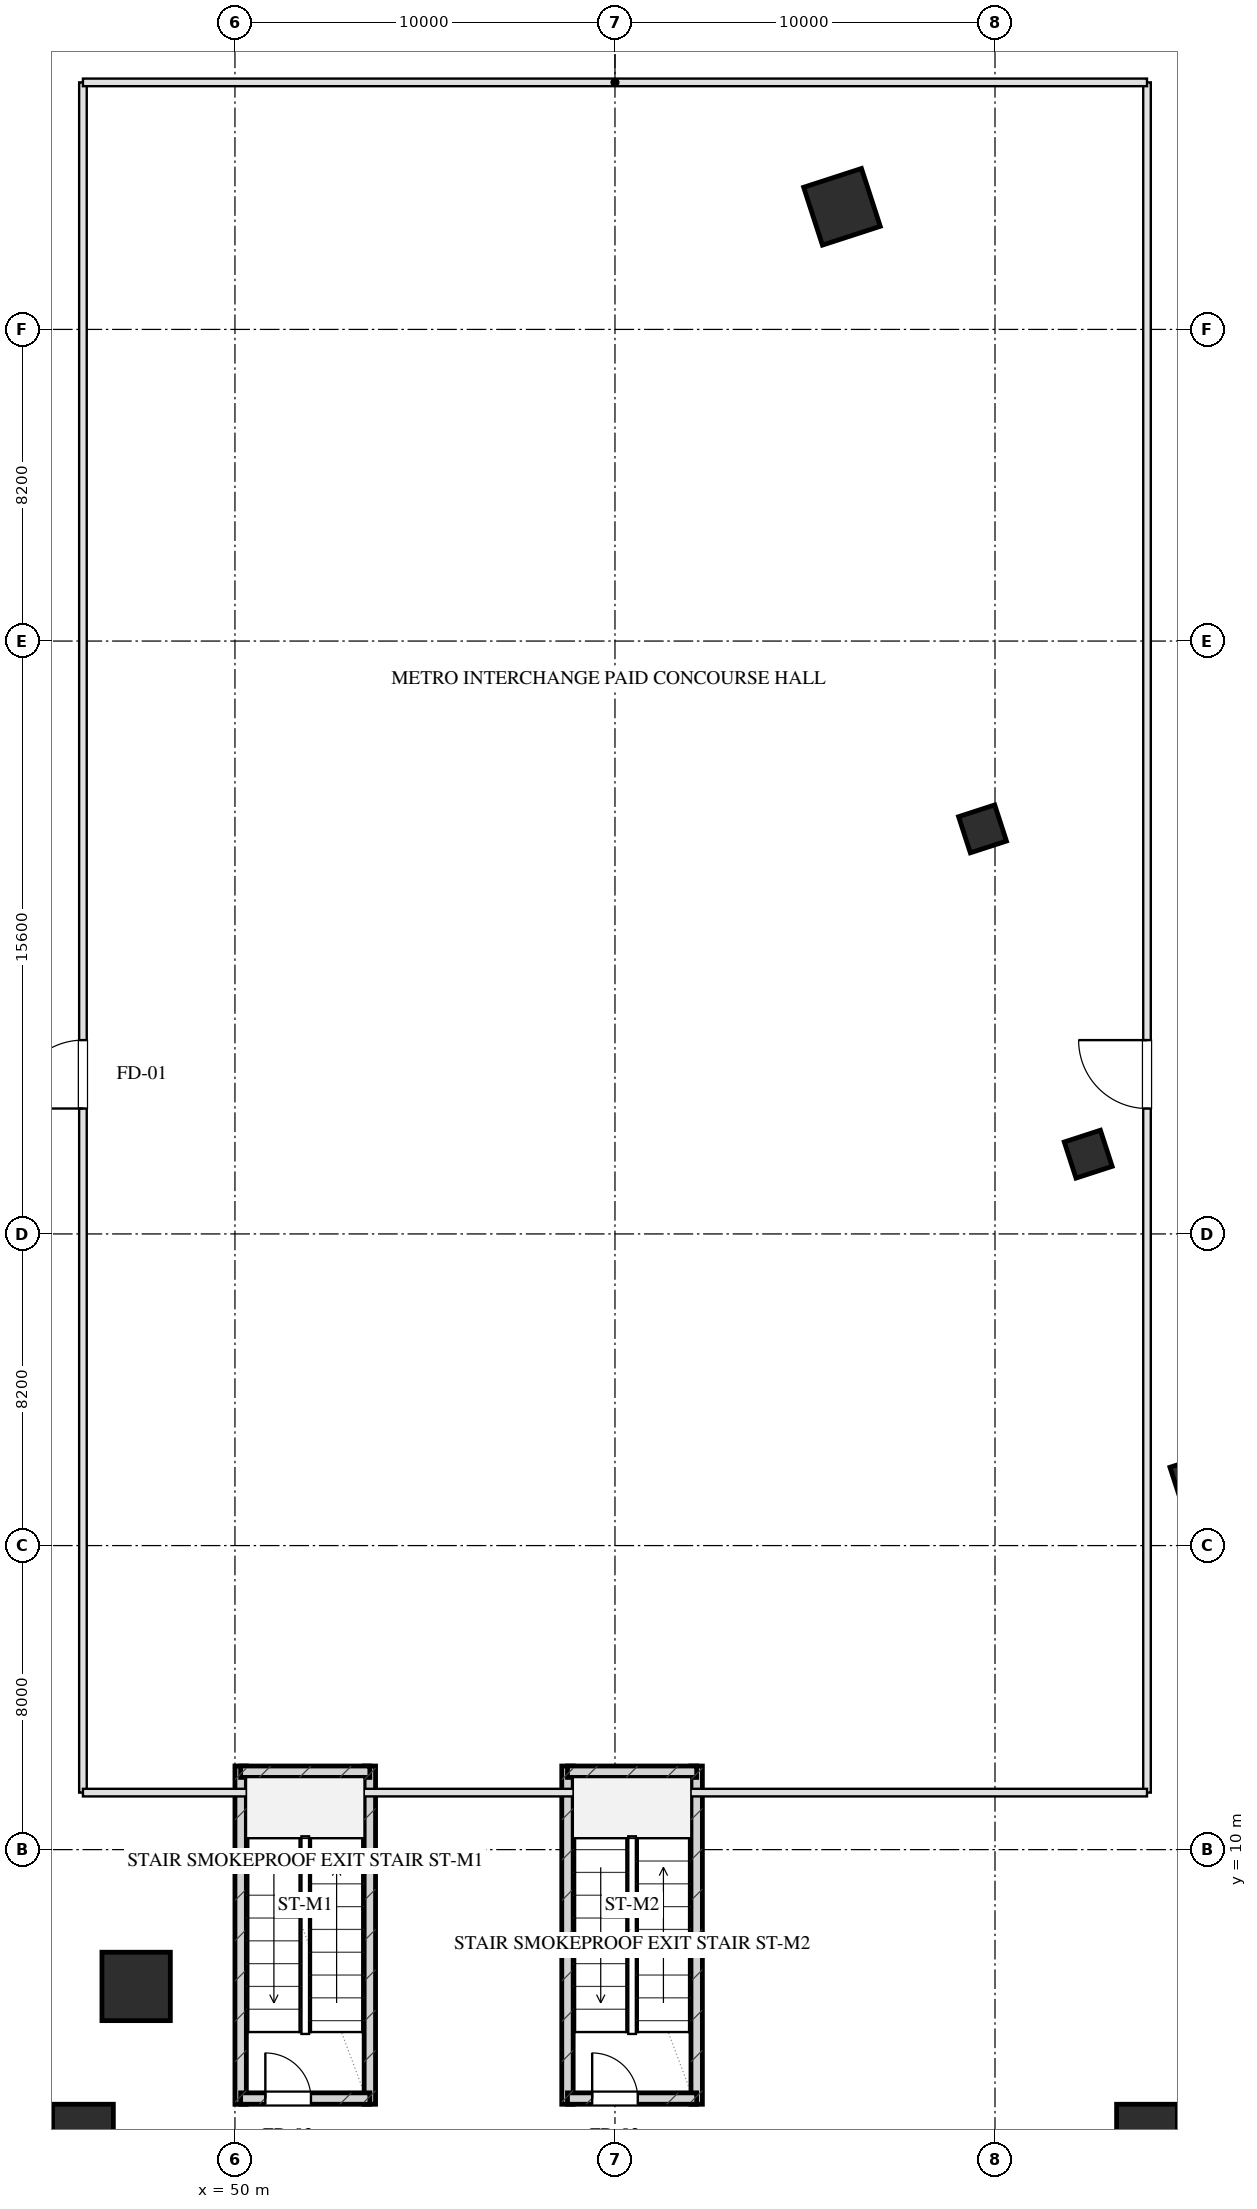
"""IFC4 building model, lengths in metres.
Left out: names, types, materials, properties, quantities, classifications, styles, units other than length and angle.
Written with IfcOpenShell. Run it as: python <this file> out.ifc"""

import sys

from ifc_helpers import new_model, si_unit, direction, frame, frame_2d, origin, origin_2d, place, context, subcontext, project, spatial, rectangle, hollow_rectangle, extrude, element, fill, save


model = new_model("IFC4")
c1 = context("Model", 3, precision=1e-05, world=origin(), true_north=direction((0.0, 1.0)))
c2 = subcontext(c1, "Body", "Model", "MODEL_VIEW")
j1 = project(units=[si_unit("LENGTHUNIT", "METRE"), si_unit("PLANEANGLEUNIT", "RADIAN")], contexts=[c1])
p1 = place(None, origin())
s1 = spatial("IfcSite", under=j1, at=p1, CompositionType="ELEMENT")
p2 = place(p1, origin())
s2 = spatial("IfcBuilding", under=s1, at=p2, CompositionType="ELEMENT")
p3 = place(p2, frame((0.0, 0.0, -6.0)))
s3 = spatial("IfcBuildingStorey", under=s2, at=p3, CompositionType="ELEMENT", Elevation=-6.0)
for number, where, z_axis, x_axis in (
    (1, (50.15, 3.3, 0.0), (0.0, 0.0, 1.0), (0.0, 1.0, 0.0)),
    (2, (53.55, 3.3, 0.0), (0.0, 0.0, 1.0), (0.0, 1.0, 0.0)),
):
    element("IfcWall", number, at=place(p3, frame(where, z_axis=z_axis, x_axis=x_axis)), inside=s3, PredefinedType="SHEAR", context=c2, shape_type="SweptSolid", body=[
        extrude(rectangle(XDim=8.9, YDim=0.3, at=frame_2d((4.45, 0.0))), origin(), (0.0, 0.0, 1.0), 6.0),
    ])
p4 = place(p3, frame((50.15, 12.05, 0.0), z_axis=(0.0, 0.0, 1.0), x_axis=(1.0, 0.0, 0.0)))
e3 = element("IfcWall", 3, at=p4, inside=s3, PredefinedType="SHEAR", context=c2, shape_type="SweptSolid", body=[
    extrude(rectangle(XDim=3.4, YDim=0.3, at=frame_2d((1.7, 0.0))), origin(), (0.0, 0.0, 1.0), 6.0),
])
p5 = place(p3, frame((50.15, 3.45, 0.0), z_axis=(0.0, 0.0, 1.0), x_axis=(1.0, 0.0, 0.0)))
e4 = element("IfcWall", 4, at=p5, inside=s3, PredefinedType="SHEAR", context=c2, shape_type="SweptSolid", body=[
    extrude(rectangle(XDim=3.4, YDim=0.3, at=frame_2d((1.7, 0.0))), origin(), (0.0, 0.0, 1.0), 6.0),
])
p6 = place(p5, frame((0.65, 0.0, 0.0)))
e5 = element("IfcOpeningElement", 5, at=p6, cuts=e4, PredefinedType="OPENING", context=c2, shape_type="SweptSolid", body=[
    extrude(rectangle(XDim=1.2, YDim=2.05, at=frame_2d((0.6, 1.025))), frame((0.0, 0.16, 0.0), z_axis=(0.0, -1.0, 0.0), x_axis=(1.0, 0.0, 0.0)), (0.0, 0.0, 1.0), 0.32),
])
for number, where, z_axis, x_axis in (
    (6, (58.75, 3.3, 0.0), (0.0, 0.0, 1.0), (0.0, 1.0, 0.0)),
    (7, (62.15, 3.3, 0.0), (0.0, 0.0, 1.0), (0.0, 1.0, 0.0)),
):
    element("IfcWall", number, at=place(p3, frame(where, z_axis=z_axis, x_axis=x_axis)), inside=s3, PredefinedType="SHEAR", context=c2, shape_type="SweptSolid", body=[
        extrude(rectangle(XDim=8.9, YDim=0.3, at=frame_2d((4.45, 0.0))), origin(), (0.0, 0.0, 1.0), 6.0),
    ])
p7 = place(p3, frame((58.75, 12.05, 0.0), z_axis=(0.0, 0.0, 1.0), x_axis=(1.0, 0.0, 0.0)))
e8 = element("IfcWall", 8, at=p7, inside=s3, PredefinedType="SHEAR", context=c2, shape_type="SweptSolid", body=[
    extrude(rectangle(XDim=3.4, YDim=0.3, at=frame_2d((1.7, 0.0))), origin(), (0.0, 0.0, 1.0), 6.0),
])
p8 = place(p3, frame((58.75, 3.45, 0.0), z_axis=(0.0, 0.0, 1.0), x_axis=(1.0, 0.0, 0.0)))
e9 = element("IfcWall", 9, at=p8, inside=s3, PredefinedType="SHEAR", context=c2, shape_type="SweptSolid", body=[
    extrude(rectangle(XDim=3.4, YDim=0.3, at=frame_2d((1.7, 0.0))), origin(), (0.0, 0.0, 1.0), 6.0),
])
p9 = place(p8, frame((0.65, 0.0, 0.0)))
e10 = element("IfcOpeningElement", 10, at=p9, cuts=e9, PredefinedType="OPENING", context=c2, shape_type="SweptSolid", body=[
    extrude(rectangle(XDim=1.2, YDim=2.05, at=frame_2d((0.6, 1.025))), frame((0.0, 0.16, 0.0), z_axis=(0.0, -1.0, 0.0), x_axis=(1.0, 0.0, 0.0)), (0.0, 0.0, 1.0), 0.32),
])
for number, where, z_axis, x_axis in (
    (11, (46.0, 2.5, 0.0), (0.0, 0.0, 1.0), (1.0, 0.0, 0.0)),
    (12, (74.0, 2.5, 0.0), (0.0, 0.0, 1.0), (1.0, 0.0, 0.0)),
):
    element("IfcColumn", number, at=place(p3, frame(where, z_axis=z_axis, x_axis=x_axis)), inside=s3, PredefinedType="COLUMN", context=c2, shape_type="SweptSolid", body=[
        extrude(hollow_rectangle(XDim=1.6, YDim=1.6, WallThickness=0.055, at=origin_2d()), origin(), (0.0, 0.0, 1.0), 6.001),
    ])
p10 = place(p3, frame((47.4, 6.4, 0.0), z_axis=(0.0, 0.0, 1.0), x_axis=(1.0, 0.0, 0.0)))
e13 = element("IfcColumn", 13, at=p10, inside=s3, PredefinedType="COLUMN", context=c2, shape_type="SweptSolid", body=[
    extrude(hollow_rectangle(XDim=1.8, YDim=1.8, WallThickness=0.06, at=origin_2d()), origin(), (0.0, 0.0, 1.0), 6.001),
])
p11 = place(p3, frame((65.973, 53.226, 0.0), z_axis=(0.0, 0.0, 1.0), x_axis=(0.951056516295, 0.309016994375, 0.0)))
e14 = element("IfcColumn", 14, at=p11, inside=s3, PredefinedType="COLUMN", context=c2, shape_type="SweptSolid", body=[
    extrude(hollow_rectangle(XDim=1.6, YDim=1.6, WallThickness=0.055, at=origin_2d()), origin(), (0.0, 0.0, 1.0), 6.001),
])
for number, where, z_axis, x_axis in (
    (15, (75.234, 19.739, 0.0), (0.0, 0.0, 1.0), (0.951, 0.309, 0.0)),
    (16, (72.453, 28.299, 0.0), (0.0, 0.0, 1.0), (0.951, 0.309, 0.0)),
    (17, (69.672, 36.858, 0.0), (0.0, 0.0, 1.0), (0.951, 0.309, 0.0)),
):
    element("IfcColumn", number, at=place(p3, frame(where, z_axis=z_axis, x_axis=x_axis)), inside=s3, PredefinedType="COLUMN", context=c2, shape_type="SweptSolid", body=[
        extrude(hollow_rectangle(XDim=1.0, YDim=1.0, WallThickness=0.036, at=origin_2d()), origin(), (0.0, 0.0, 1.0), 6.001),
    ])
p12 = place(p3, frame((46.0, 11.5, 0.0), z_axis=(0.0, 0.0, 1.0), x_axis=(0.0, 1.0, 0.0)))
e18 = element("IfcWall", 18, at=p12, inside=s3, PredefinedType="PARTITIONING", context=c2, shape_type="SweptSolid", body=[
    extrude(rectangle(XDim=45.0, YDim=0.2, at=frame_2d((22.5, 0.0))), origin(), (0.0, 0.0, 1.0), 5.685),
])
p13 = place(p12, frame((18.0, 0.0, 0.0)))
e19 = element("IfcOpeningElement", 19, at=p13, cuts=e18, PredefinedType="OPENING", context=c2, shape_type="SweptSolid", body=[
    extrude(rectangle(XDim=1.8, YDim=2.05, at=frame_2d((0.9, 1.025))), frame((0.0, 0.11, 0.0), z_axis=(0.0, -1.0, 0.0), x_axis=(1.0, 0.0, 0.0)), (0.0, 0.0, 1.0), 0.22),
])
p14 = place(p3, frame((74.0, 11.5, 0.0), z_axis=(0.0, 0.0, 1.0), x_axis=(0.0, 1.0, 0.0)))
e20 = element("IfcWall", 20, at=p14, inside=s3, PredefinedType="PARTITIONING", context=c2, shape_type="SweptSolid", body=[
    extrude(rectangle(XDim=45.0, YDim=0.2, at=frame_2d((22.5, 0.0))), origin(), (0.0, 0.0, 1.0), 5.685),
])
p15 = place(p14, frame((18.0, 0.0, 0.0)))
e21 = element("IfcOpeningElement", 21, at=p15, cuts=e20, PredefinedType="OPENING", context=c2, shape_type="SweptSolid", body=[
    extrude(rectangle(XDim=1.8, YDim=2.05, at=frame_2d((0.9, 1.025))), frame((0.0, 0.11, 0.0), z_axis=(0.0, -1.0, 0.0), x_axis=(1.0, 0.0, 0.0)), (0.0, 0.0, 1.0), 0.22),
])
for number, where, z_axis, x_axis in (
    (22, (46.0, 56.5, 0.0), (0.0, 0.0, 1.0), (1.0, 0.0, 0.0)),
    (23, (46.0, 11.5, 0.0), (0.0, 0.0, 1.0), (1.0, 0.0, 0.0)),
):
    element("IfcWall", number, at=place(p3, frame(where, z_axis=z_axis, x_axis=x_axis)), inside=s3, PredefinedType="PARTITIONING", context=c2, shape_type="SweptSolid", body=[
        extrude(rectangle(XDim=28.0, YDim=0.2, at=frame_2d((14.0, 0.0))), origin(), (0.0, 0.0, 1.0), 5.685),
    ])
p16 = place(p13, origin())
e24 = element("IfcDoor", 24, at=p16, inside=s3, OperationType="SINGLE_SWING_LEFT", PredefinedType="DOOR", context=c2, shape_type="SweptSolid", body=[
    extrude(rectangle(XDim=1.8, YDim=2.05, at=frame_2d((0.9, 1.025))), frame((0.0, 0.025, 0.0), z_axis=(0.0, -1.0, 0.0), x_axis=(1.0, 0.0, 0.0)), (0.0, 0.0, 1.0), 0.05),
])
fill(e19, e24)
p17 = place(p15, origin())
e25 = element("IfcDoor", 25, at=p17, inside=s3, OperationType="SINGLE_SWING_RIGHT", PredefinedType="DOOR", context=c2, shape_type="SweptSolid", body=[
    extrude(rectangle(XDim=1.8, YDim=2.05, at=frame_2d((0.9, 1.025))), frame((0.0, 0.025, 0.0), z_axis=(0.0, -1.0, 0.0), x_axis=(1.0, 0.0, 0.0)), (0.0, 0.0, 1.0), 0.05),
])
fill(e21, e25)
p18 = place(p6, origin())
e26 = element("IfcDoor", 26, at=p18, inside=s3, OperationType="SINGLE_SWING_LEFT", PredefinedType="DOOR", context=c2, shape_type="SweptSolid", body=[
    extrude(rectangle(XDim=1.2, YDim=2.05, at=frame_2d((0.6, 1.025))), frame((0.0, 0.025, 0.0), z_axis=(0.0, -1.0, 0.0), x_axis=(1.0, 0.0, 0.0)), (0.0, 0.0, 1.0), 0.05),
])
fill(e5, e26)
p19 = place(p9, origin())
e27 = element("IfcDoor", 27, at=p19, inside=s3, OperationType="SINGLE_SWING_LEFT", PredefinedType="DOOR", context=c2, shape_type="SweptSolid", body=[
    extrude(rectangle(XDim=1.2, YDim=2.05, at=frame_2d((0.6, 1.025))), frame((0.0, 0.025, 0.0), z_axis=(0.0, -1.0, 0.0), x_axis=(1.0, 0.0, 0.0)), (0.0, 0.0, 1.0), 0.05),
])
fill(e10, e27)
save(model, sys.argv[1])
